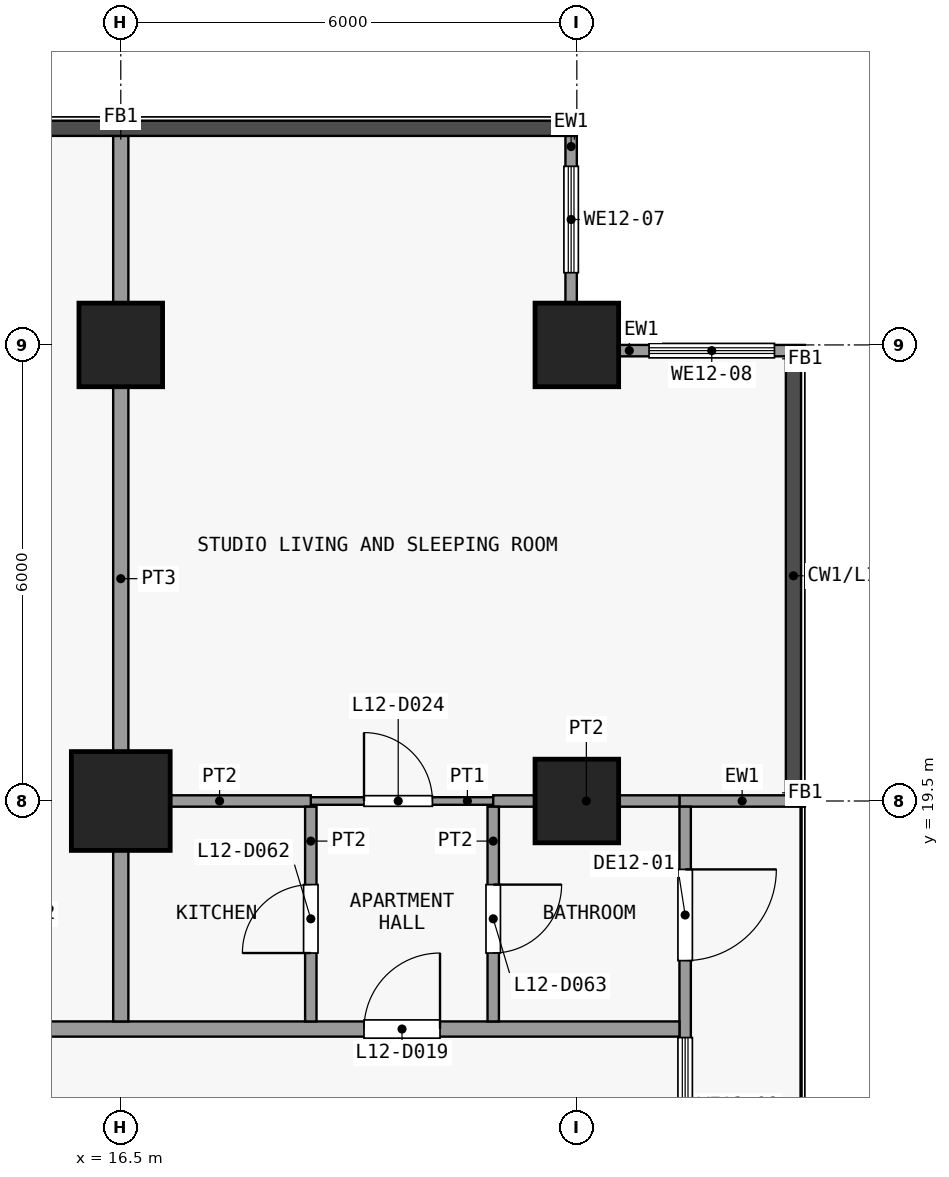
"""IFC4 building model, lengths in metres.
Left out: names, types, materials, properties, quantities, classifications, styles, units other than length and angle.
Written with IfcOpenShell. Run it as: python <this file> out.ifc"""

import sys

from ifc_helpers import new_model, si_unit, direction, frame, frame_2d, origin, origin_2d, place, context, subcontext, project, spatial, rectangle, extrude, element, fill, save


model = new_model("IFC4")
c1 = context("Model", 3, precision=1e-05, world=origin(), true_north=direction((0.0, 1.0)))
c2 = subcontext(c1, "Body", "Model", "MODEL_VIEW")
j1 = project(units=[si_unit("LENGTHUNIT", "METRE"), si_unit("PLANEANGLEUNIT", "RADIAN")], contexts=[c1])
p1 = place(None, origin())
s1 = spatial("IfcSite", under=j1, at=p1, CompositionType="ELEMENT")
p2 = place(p1, origin())
s2 = spatial("IfcBuilding", under=s1, at=p2, CompositionType="ELEMENT")
p3 = place(p2, frame((0.0, 0.0, 54.1)))
s3 = spatial("IfcBuildingStorey", under=s2, at=p3, CompositionType="ELEMENT", Elevation=54.1)
p4 = place(p3, frame((16.5, 19.5, 0.0), z_axis=(0.0, 0.0, 1.0), x_axis=(1.0, 0.0, 0.0)))
e1 = element("IfcColumn", 1, at=p4, inside=s3, PredefinedType="COLUMN", context=c2, shape_type="SweptSolid", body=[
    extrude(rectangle(XDim=1.3, YDim=1.3, at=origin_2d()), origin(), (0.0, 0.0, 1.0), 3.6),
])
for number, where, z_axis, x_axis in (
    (2, (16.5, 25.5, 0.0), (0.0, 0.0, 1.0), (1.0, 0.0, 0.0)),
    (3, (22.5, 19.5, 0.0), (0.0, 0.0, 1.0), (1.0, 0.0, 0.0)),
    (4, (22.5, 25.5, 0.0), (0.0, 0.0, 1.0), (1.0, 0.0, 0.0)),
):
    element("IfcColumn", number, at=place(p3, frame(where, z_axis=z_axis, x_axis=x_axis)), inside=s3, PredefinedType="COLUMN", context=c2, shape_type="SweptSolid", body=[
        extrude(rectangle(XDim=1.1, YDim=1.1, at=origin_2d()), origin(), (0.0, 0.0, 1.0), 3.6),
    ])
p5 = place(p3, frame((22.425, 28.25, 0.0), z_axis=(0.0, 0.0, 1.0), x_axis=(0.0, -1.0, 0.0)))
e5 = element("IfcWall", 5, at=p5, inside=s3, PredefinedType="SOLIDWALL", context=c2, shape_type="SweptSolid", body=[
    extrude(rectangle(XDim=2.2, YDim=0.15, at=frame_2d((1.1, 0.0))), origin(), (0.0, 0.0, 1.0), 3.3),
])
p6 = place(p5, frame((0.4, 0.0, 0.9)))
e6 = element("IfcOpeningElement", 6, at=p6, cuts=e5, PredefinedType="OPENING", context=c2, shape_type="SweptSolid", body=[
    extrude(rectangle(XDim=1.4, YDim=2.4, at=frame_2d((0.7, 1.2))), frame((0.0, 0.085, 0.0), z_axis=(0.0, -1.0, 0.0), x_axis=(1.0, 0.0, 0.0)), (0.0, 0.0, 1.0), 0.17),
])
p7 = place(p3, frame((23.05, 25.425, 0.0), z_axis=(0.0, 0.0, 1.0), x_axis=(1.0, 0.0, 0.0)))
e7 = element("IfcWall", 7, at=p7, inside=s3, PredefinedType="SOLIDWALL", context=c2, shape_type="SweptSolid", body=[
    extrude(rectangle(XDim=2.45, YDim=0.15, at=frame_2d((1.225, 0.0))), origin(), (0.0, 0.0, 1.0), 3.3),
])
p8 = place(p7, frame((0.4, 0.0, 0.9)))
e8 = element("IfcOpeningElement", 8, at=p8, cuts=e7, PredefinedType="OPENING", context=c2, shape_type="SweptSolid", body=[
    extrude(rectangle(XDim=1.65, YDim=2.4, at=frame_2d((0.825, 1.2))), frame((0.0, 0.085, 0.0), z_axis=(0.0, -1.0, 0.0), x_axis=(1.0, 0.0, 0.0)), (0.0, 0.0, 1.0), 0.17),
])
p9 = place(p3, frame((23.85, 19.5, 0.0), z_axis=(0.0, 0.0, 1.0), x_axis=(1.0, 0.0, 0.0)))
e9 = element("IfcWall", 9, at=p9, inside=s3, PredefinedType="SOLIDWALL", context=c2, shape_type="SweptSolid", body=[
    extrude(rectangle(XDim=1.65, YDim=0.15, at=frame_2d((0.825, 0.0))), origin(), (0.0, 0.0, 1.0), 3.3),
])
p10 = place(p3, frame((23.925, 19.425, 0.0), z_axis=(0.0, 0.0, 1.0), x_axis=(0.0, -1.0, 0.0)))
e10 = element("IfcWall", 10, at=p10, inside=s3, PredefinedType="SOLIDWALL", context=c2, shape_type="SweptSolid", body=[
    extrude(rectangle(XDim=5.85, YDim=0.15, at=frame_2d((2.925, 0.0))), origin(), (0.0, 0.0, 1.0), 3.3),
])
p11 = place(p10, frame((0.825, 0.0, 0.0)))
e11 = element("IfcOpeningElement", 11, at=p11, cuts=e10, PredefinedType="OPENING", context=c2, shape_type="SweptSolid", body=[
    extrude(rectangle(XDim=1.2, YDim=2.4, at=frame_2d((0.6, 1.2))), frame((0.0, 0.085, 0.0), z_axis=(0.0, -1.0, 0.0), x_axis=(1.0, 0.0, 0.0)), (0.0, 0.0, 1.0), 0.17),
])
p12 = place(p10, frame((3.038, 0.0, 0.9)))
e12 = element("IfcOpeningElement", 12, at=p12, cuts=e10, PredefinedType="OPENING", context=c2, shape_type="SweptSolid", body=[
    extrude(rectangle(XDim=1.8, YDim=2.1, at=frame_2d((0.9, 1.05))), frame((0.0, 0.085, 0.0), z_axis=(0.0, -1.0, 0.0), x_axis=(1.0, 0.0, 0.0)), (0.0, 0.0, 1.0), 0.17),
])
p13 = place(p3, frame((-25.35, 16.5, 0.0), z_axis=(0.0, 0.0, 1.0), x_axis=(1.0, 0.0, 0.0)))
e13 = element("IfcWall", 13, at=p13, inside=s3, PredefinedType="PARTITIONING", context=c2, shape_type="SweptSolid", body=[
    extrude(rectangle(XDim=49.2, YDim=0.2, at=frame_2d((24.6, 0.0))), origin(), (0.0, 0.0, 1.0), 3.3),
])
p14 = place(p13, frame((7.05, 0.0, 0.0)))
e14 = element("IfcOpeningElement", 14, at=p14, cuts=e13, PredefinedType="OPENING", context=c2, shape_type="SweptSolid", body=[
    extrude(rectangle(XDim=1.0, YDim=2.1, at=frame_2d((0.5, 1.05))), frame((0.0, 0.11, 0.0), z_axis=(0.0, -1.0, 0.0), x_axis=(1.0, 0.0, 0.0)), (0.0, 0.0, 1.0), 0.22),
])
p15 = place(p13, frame((15.55, 0.0, 0.0)))
e15 = element("IfcOpeningElement", 15, at=p15, cuts=e13, PredefinedType="OPENING", context=c2, shape_type="SweptSolid", body=[
    extrude(rectangle(XDim=1.0, YDim=2.1, at=frame_2d((0.5, 1.05))), frame((0.0, 0.11, 0.0), z_axis=(0.0, -1.0, 0.0), x_axis=(1.0, 0.0, 0.0)), (0.0, 0.0, 1.0), 0.22),
])
p16 = place(p13, frame((24.05, 0.0, 0.0)))
e16 = element("IfcOpeningElement", 16, at=p16, cuts=e13, PredefinedType="OPENING", context=c2, shape_type="SweptSolid", body=[
    extrude(rectangle(XDim=1.0, YDim=2.1, at=frame_2d((0.5, 1.05))), frame((0.0, 0.11, 0.0), z_axis=(0.0, -1.0, 0.0), x_axis=(1.0, 0.0, 0.0)), (0.0, 0.0, 1.0), 0.22),
])
p17 = place(p13, frame((36.55, 0.0, 0.0)))
e17 = element("IfcOpeningElement", 17, at=p17, cuts=e13, PredefinedType="OPENING", context=c2, shape_type="SweptSolid", body=[
    extrude(rectangle(XDim=1.0, YDim=2.1, at=frame_2d((0.5, 1.05))), frame((0.0, 0.11, 0.0), z_axis=(0.0, -1.0, 0.0), x_axis=(1.0, 0.0, 0.0)), (0.0, 0.0, 1.0), 0.22),
])
p18 = place(p13, frame((45.05, 0.0, 0.0)))
e18 = element("IfcOpeningElement", 18, at=p18, cuts=e13, PredefinedType="OPENING", context=c2, shape_type="SweptSolid", body=[
    extrude(rectangle(XDim=1.0, YDim=2.1, at=frame_2d((0.5, 1.05))), frame((0.0, 0.11, 0.0), z_axis=(0.0, -1.0, 0.0), x_axis=(1.0, 0.0, 0.0)), (0.0, 0.0, 1.0), 0.22),
])
p19 = place(p3, frame((19.0, 19.5, 0.0), z_axis=(0.0, 0.0, 1.0), x_axis=(1.0, 0.0, 0.0)))
e19 = element("IfcWall", 19, at=p19, inside=s3, PredefinedType="PARTITIONING", context=c2, shape_type="SweptSolid", body=[
    extrude(rectangle(XDim=2.4, YDim=0.1, at=frame_2d((1.2, 0.0))), origin(), (0.0, 0.0, 1.0), 3.3),
])
p20 = place(p19, frame((0.7, 0.0, 0.0)))
e20 = element("IfcOpeningElement", 20, at=p20, cuts=e19, PredefinedType="OPENING", context=c2, shape_type="SweptSolid", body=[
    extrude(rectangle(XDim=0.9, YDim=2.1, at=frame_2d((0.45, 1.05))), frame((0.0, 0.06, 0.0), z_axis=(0.0, -1.0, 0.0), x_axis=(1.0, 0.0, 0.0)), (0.0, 0.0, 1.0), 0.12),
])
p21 = place(p3, frame((16.6, 19.5, 0.0), z_axis=(0.0, 0.0, 1.0), x_axis=(1.0, 0.0, 0.0)))
e21 = element("IfcWall", 21, at=p21, inside=s3, PredefinedType="PARTITIONING", context=c2, shape_type="SweptSolid", body=[
    extrude(rectangle(XDim=2.4, YDim=0.15, at=frame_2d((1.2, 0.0))), origin(), (0.0, 0.0, 1.0), 3.3),
])
p22 = place(p3, frame((21.4, 19.5, 0.0), z_axis=(0.0, 0.0, 1.0), x_axis=(1.0, 0.0, 0.0)))
e22 = element("IfcWall", 22, at=p22, inside=s3, PredefinedType="PARTITIONING", context=c2, shape_type="SweptSolid", body=[
    extrude(rectangle(XDim=2.45, YDim=0.15, at=frame_2d((1.225, 0.0))), origin(), (0.0, 0.0, 1.0), 3.3),
])
p23 = place(p3, frame((16.5, 16.6, 0.0), z_axis=(0.0, 0.0, 1.0), x_axis=(0.0, 1.0, 0.0)))
e23 = element("IfcWall", 23, at=p23, inside=s3, PredefinedType="PARTITIONING", context=c2, shape_type="SweptSolid", body=[
    extrude(rectangle(XDim=11.65, YDim=0.2, at=frame_2d((5.825, 0.0))), origin(), (0.0, 0.0, 1.0), 3.3),
])
p24 = place(p3, frame((19.0, 16.6, 0.0), z_axis=(0.0, 0.0, 1.0), x_axis=(0.0, 1.0, 0.0)))
e24 = element("IfcWall", 24, at=p24, inside=s3, PredefinedType="PARTITIONING", context=c2, shape_type="SweptSolid", body=[
    extrude(rectangle(XDim=2.825, YDim=0.15, at=frame_2d((1.413, 0.0))), origin(), (0.0, 0.0, 1.0), 3.3),
])
p25 = place(p24, frame((0.9, 0.0, 0.0)))
e25 = element("IfcOpeningElement", 25, at=p25, cuts=e24, PredefinedType="OPENING", context=c2, shape_type="SweptSolid", body=[
    extrude(rectangle(XDim=0.9, YDim=2.1, at=frame_2d((0.45, 1.05))), frame((0.0, 0.085, 0.0), z_axis=(0.0, -1.0, 0.0), x_axis=(1.0, 0.0, 0.0)), (0.0, 0.0, 1.0), 0.17),
])
p26 = place(p3, frame((21.4, 16.6, 0.0), z_axis=(0.0, 0.0, 1.0), x_axis=(0.0, 1.0, 0.0)))
e26 = element("IfcWall", 26, at=p26, inside=s3, PredefinedType="PARTITIONING", context=c2, shape_type="SweptSolid", body=[
    extrude(rectangle(XDim=2.825, YDim=0.15, at=frame_2d((1.413, 0.0))), origin(), (0.0, 0.0, 1.0), 3.3),
])
p27 = place(p26, frame((0.9, 0.0, 0.0)))
e27 = element("IfcOpeningElement", 27, at=p27, cuts=e26, PredefinedType="OPENING", context=c2, shape_type="SweptSolid", body=[
    extrude(rectangle(XDim=0.9, YDim=2.1, at=frame_2d((0.45, 1.05))), frame((0.0, 0.085, 0.0), z_axis=(0.0, -1.0, 0.0), x_axis=(1.0, 0.0, 0.0)), (0.0, 0.0, 1.0), 0.17),
])
p28 = place(p6, origin())
e28 = element("IfcWindow", 28, at=p28, inside=s3, PartitioningType="SINGLE_PANEL", PredefinedType="WINDOW", context=c2, shape_type="SweptSolid", body=[
    extrude(rectangle(XDim=1.4, YDim=2.4, at=frame_2d((0.7, 1.2))), frame((0.0, 0.03, 0.0), z_axis=(0.0, -1.0, 0.0), x_axis=(1.0, 0.0, 0.0)), (0.0, 0.0, 1.0), 0.06),
])
fill(e6, e28)
p29 = place(p8, origin())
e29 = element("IfcWindow", 29, at=p29, inside=s3, PartitioningType="SINGLE_PANEL", PredefinedType="WINDOW", context=c2, shape_type="SweptSolid", body=[
    extrude(rectangle(XDim=1.65, YDim=2.4, at=frame_2d((0.825, 1.2))), frame((0.0, 0.03, 0.0), z_axis=(0.0, -1.0, 0.0), x_axis=(1.0, 0.0, 0.0)), (0.0, 0.0, 1.0), 0.06),
])
fill(e8, e29)
p30 = place(p11, origin())
e30 = element("IfcDoor", 30, at=p30, inside=s3, OperationType="SINGLE_SWING_LEFT", PredefinedType="DOOR", context=c2, shape_type="SweptSolid", body=[
    extrude(rectangle(XDim=1.2, YDim=2.4, at=frame_2d((0.6, 1.2))), frame((0.0, 0.025, 0.0), z_axis=(0.0, -1.0, 0.0), x_axis=(1.0, 0.0, 0.0)), (0.0, 0.0, 1.0), 0.05),
])
fill(e11, e30)
p31 = place(p12, origin())
e31 = element("IfcWindow", 31, at=p31, inside=s3, PartitioningType="SINGLE_PANEL", PredefinedType="WINDOW", context=c2, shape_type="SweptSolid", body=[
    extrude(rectangle(XDim=1.8, YDim=2.1, at=frame_2d((0.9, 1.05))), frame((0.0, 0.03, 0.0), z_axis=(0.0, -1.0, 0.0), x_axis=(1.0, 0.0, 0.0)), (0.0, 0.0, 1.0), 0.06),
])
fill(e12, e31)
p32 = place(p18, origin())
e32 = element("IfcDoor", 32, at=p32, inside=s3, OperationType="SINGLE_SWING_LEFT", PredefinedType="DOOR", context=c2, shape_type="SweptSolid", body=[
    extrude(rectangle(XDim=1.0, YDim=2.1, at=frame_2d((0.5, 1.05))), frame((0.0, 0.025, 0.0), z_axis=(0.0, -1.0, 0.0), x_axis=(1.0, 0.0, 0.0)), (0.0, 0.0, 1.0), 0.05),
])
fill(e18, e32)
p33 = place(p20, origin())
e33 = element("IfcDoor", 33, at=p33, inside=s3, OperationType="SINGLE_SWING_RIGHT", PredefinedType="DOOR", context=c2, shape_type="SweptSolid", body=[
    extrude(rectangle(XDim=0.9, YDim=2.1, at=frame_2d((0.45, 1.05))), frame((0.0, 0.025, 0.0), z_axis=(0.0, -1.0, 0.0), x_axis=(1.0, 0.0, 0.0)), (0.0, 0.0, 1.0), 0.05),
])
fill(e20, e33)
p34 = place(p25, origin())
e34 = element("IfcDoor", 34, at=p34, inside=s3, OperationType="SINGLE_SWING_RIGHT", PredefinedType="DOOR", context=c2, shape_type="SweptSolid", body=[
    extrude(rectangle(XDim=0.9, YDim=2.1, at=frame_2d((0.45, 1.05))), frame((0.0, 0.025, 0.0), z_axis=(0.0, -1.0, 0.0), x_axis=(1.0, 0.0, 0.0)), (0.0, 0.0, 1.0), 0.05),
])
fill(e25, e34)
p35 = place(p27, origin())
e35 = element("IfcDoor", 35, at=p35, inside=s3, OperationType="SINGLE_SWING_RIGHT", PredefinedType="DOOR", context=c2, shape_type="SweptSolid", body=[
    extrude(rectangle(XDim=0.9, YDim=2.1, at=frame_2d((0.45, 1.05))), frame((0.0, 0.025, 0.0), z_axis=(0.0, -1.0, 0.0), x_axis=(1.0, 0.0, 0.0)), (0.0, 0.0, 1.0), 0.05),
])
fill(e27, e35)
save(model, sys.argv[1])
